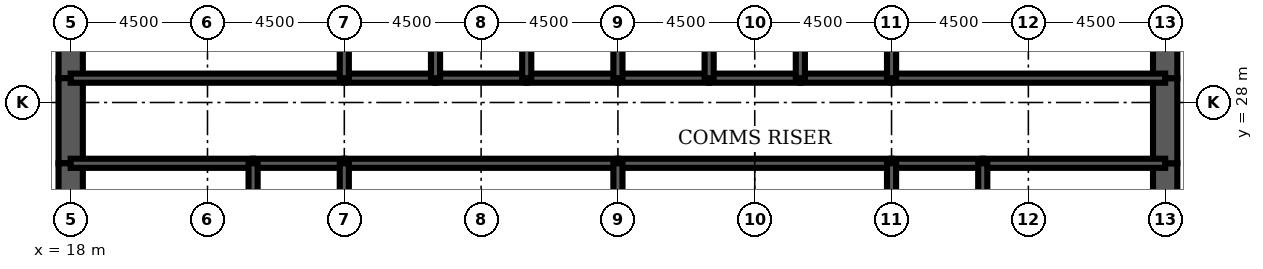
"""IFC4 building model, lengths in metres.
Left out: names, types, materials, properties, quantities, classifications, styles, units other than length and angle.
Written with IfcOpenShell. Run it as: python <this file> out.ifc"""

import sys

from ifc_helpers import new_model, si_unit, direction, frame, frame_2d, origin, place, context, subcontext, project, spatial, rectangle, extrude, element, fill, save


model = new_model("IFC4")
c1 = context("Model", 3, precision=1e-05, world=origin(), true_north=direction((0.0, 1.0)))
c2 = subcontext(c1, "Body", "Model", "MODEL_VIEW")
j1 = project(units=[si_unit("LENGTHUNIT", "METRE"), si_unit("PLANEANGLEUNIT", "RADIAN")], contexts=[c1])
p1 = place(None, origin())
s1 = spatial("IfcSite", under=j1, at=p1, CompositionType="ELEMENT")
p2 = place(p1, origin())
s2 = spatial("IfcBuilding", under=s1, at=p2, CompositionType="ELEMENT")
p3 = place(p2, frame((0.0, 0.0, 206.8)))
s3 = spatial("IfcBuildingStorey", under=s2, at=p3, CompositionType="ELEMENT", Elevation=206.8)
p4 = place(p3, frame((18.0, 32.0, 0.0), z_axis=(0.0, 0.0, 1.0), x_axis=(0.0, -1.0, 0.0)))
e1 = element("IfcWall", 1, at=p4, inside=s3, PredefinedType="SHEAR", context=c2, shape_type="SweptSolid", body=[
    extrude(rectangle(XDim=3.2, YDim=0.8, at=frame_2d((1.6, 0.0))), origin(), (0.0, 0.0, 1.0), 4.2),
])
p5 = place(p3, frame((18.0, 28.8, 0.0), z_axis=(0.0, 0.0, 1.0), x_axis=(0.0, -1.0, 0.0)))
e2 = element("IfcWall", 2, at=p5, inside=s3, PredefinedType="SHEAR", context=c2, shape_type="SweptSolid", body=[
    extrude(rectangle(XDim=2.8, YDim=0.8, at=frame_2d((1.4, 0.0))), origin(), (0.0, 0.0, 1.0), 4.2),
])
p6 = place(p5, frame((0.4, 0.0, 0.0)))
e3 = element("IfcOpeningElement", 3, at=p6, cuts=e2, PredefinedType="OPENING", context=c2, shape_type="SweptSolid", body=[
    extrude(rectangle(XDim=1.8, YDim=2.1, at=frame_2d((0.9, 1.05))), frame((0.0, 0.41, 0.0), z_axis=(0.0, -1.0, 0.0), x_axis=(1.0, 0.0, 0.0)), (0.0, 0.0, 1.0), 0.82),
])
for number, where, z_axis, x_axis in (
    (4, (18.0, 26.0, 0.0), (0.0, 0.0, 1.0), (0.0, -1.0, 0.0)),
    (5, (54.0, 22.0, 0.0), (0.0, 0.0, 1.0), (0.0, 1.0, 0.0)),
):
    element("IfcWall", number, at=place(p3, frame(where, z_axis=z_axis, x_axis=x_axis)), inside=s3, PredefinedType="SHEAR", context=c2, shape_type="SweptSolid", body=[
        extrude(rectangle(XDim=4.0, YDim=0.8, at=frame_2d((2.0, 0.0))), origin(), (0.0, 0.0, 1.0), 4.2),
    ])
p7 = place(p3, frame((54.0, 26.0, 0.0), z_axis=(0.0, 0.0, 1.0), x_axis=(0.0, 1.0, 0.0)))
e6 = element("IfcWall", 6, at=p7, inside=s3, PredefinedType="SHEAR", context=c2, shape_type="SweptSolid", body=[
    extrude(rectangle(XDim=2.8, YDim=0.8, at=frame_2d((1.4, 0.0))), origin(), (0.0, 0.0, 1.0), 4.2),
])
p8 = place(p7, frame((0.6, 0.0, 0.0)))
e7 = element("IfcOpeningElement", 7, at=p8, cuts=e6, PredefinedType="OPENING", context=c2, shape_type="SweptSolid", body=[
    extrude(rectangle(XDim=1.8, YDim=2.1, at=frame_2d((0.9, 1.05))), frame((0.0, 0.41, 0.0), z_axis=(0.0, -1.0, 0.0), x_axis=(1.0, 0.0, 0.0)), (0.0, 0.0, 1.0), 0.82),
])
p9 = place(p3, frame((54.0, 28.8, 0.0), z_axis=(0.0, 0.0, 1.0), x_axis=(0.0, 1.0, 0.0)))
e8 = element("IfcWall", 8, at=p9, inside=s3, PredefinedType="SHEAR", context=c2, shape_type="SweptSolid", body=[
    extrude(rectangle(XDim=3.2, YDim=0.8, at=frame_2d((1.6, 0.0))), origin(), (0.0, 0.0, 1.0), 4.2),
])
p10 = place(p3, frame((18.0, 28.8, 0.0), z_axis=(0.0, 0.0, 1.0), x_axis=(1.0, 0.0, 0.0)))
e9 = element("IfcWall", 9, at=p10, inside=s3, PredefinedType="SOLIDWALL", context=c2, shape_type="SweptSolid", body=[
    extrude(rectangle(XDim=9.0, YDim=0.3, at=frame_2d((4.5, 0.0))), origin(), (0.0, 0.0, 1.0), 4.2),
])
p11 = place(p10, frame((0.65, 0.0, 0.0)))
e10 = element("IfcOpeningElement", 10, at=p11, cuts=e9, PredefinedType="OPENING", context=c2, shape_type="SweptSolid", body=[
    extrude(rectangle(XDim=1.0, YDim=2.1, at=frame_2d((0.5, 1.05))), frame((0.0, 0.16, 0.0), z_axis=(0.0, -1.0, 0.0), x_axis=(1.0, 0.0, 0.0)), (0.0, 0.0, 1.0), 0.32),
])
p12 = place(p3, frame((27.0, 28.8, 0.0), z_axis=(0.0, 0.0, 1.0), x_axis=(1.0, 0.0, 0.0)))
e11 = element("IfcWall", 11, at=p12, inside=s3, PredefinedType="SOLIDWALL", context=c2, shape_type="SweptSolid", body=[
    extrude(rectangle(XDim=3.0, YDim=0.3, at=frame_2d((1.5, 0.0))), origin(), (0.0, 0.0, 1.0), 4.2),
])
p13 = place(p12, frame((0.95, 0.0, 0.0)))
e12 = element("IfcOpeningElement", 12, at=p13, cuts=e11, PredefinedType="OPENING", context=c2, shape_type="SweptSolid", body=[
    extrude(rectangle(XDim=1.1, YDim=2.2, at=frame_2d((0.55, 1.1))), frame((0.0, 0.16, 0.0), z_axis=(0.0, -1.0, 0.0), x_axis=(1.0, 0.0, 0.0)), (0.0, 0.0, 1.0), 0.32),
])
p14 = place(p3, frame((30.0, 28.8, 0.0), z_axis=(0.0, 0.0, 1.0), x_axis=(1.0, 0.0, 0.0)))
e13 = element("IfcWall", 13, at=p14, inside=s3, PredefinedType="SOLIDWALL", context=c2, shape_type="SweptSolid", body=[
    extrude(rectangle(XDim=3.0, YDim=0.3, at=frame_2d((1.5, 0.0))), origin(), (0.0, 0.0, 1.0), 4.2),
])
p15 = place(p14, frame((0.95, 0.0, 0.0)))
e14 = element("IfcOpeningElement", 14, at=p15, cuts=e13, PredefinedType="OPENING", context=c2, shape_type="SweptSolid", body=[
    extrude(rectangle(XDim=1.1, YDim=2.2, at=frame_2d((0.55, 1.1))), frame((0.0, 0.16, 0.0), z_axis=(0.0, -1.0, 0.0), x_axis=(1.0, 0.0, 0.0)), (0.0, 0.0, 1.0), 0.32),
])
p16 = place(p3, frame((33.0, 28.8, 0.0), z_axis=(0.0, 0.0, 1.0), x_axis=(1.0, 0.0, 0.0)))
e15 = element("IfcWall", 15, at=p16, inside=s3, PredefinedType="SOLIDWALL", context=c2, shape_type="SweptSolid", body=[
    extrude(rectangle(XDim=3.0, YDim=0.3, at=frame_2d((1.5, 0.0))), origin(), (0.0, 0.0, 1.0), 4.2),
])
p17 = place(p16, frame((0.95, 0.0, 0.0)))
e16 = element("IfcOpeningElement", 16, at=p17, cuts=e15, PredefinedType="OPENING", context=c2, shape_type="SweptSolid", body=[
    extrude(rectangle(XDim=1.1, YDim=2.2, at=frame_2d((0.55, 1.1))), frame((0.0, 0.16, 0.0), z_axis=(0.0, -1.0, 0.0), x_axis=(1.0, 0.0, 0.0)), (0.0, 0.0, 1.0), 0.32),
])
for number, where, z_axis, x_axis in (
    (17, (36.0, 28.8, 0.0), (0.0, 0.0, 1.0), (1.0, 0.0, 0.0)),
    (18, (39.0, 28.8, 0.0), (0.0, 0.0, 1.0), (1.0, 0.0, 0.0)),
):
    element("IfcWall", number, at=place(p3, frame(where, z_axis=z_axis, x_axis=x_axis)), inside=s3, PredefinedType="SOLIDWALL", context=c2, shape_type="SweptSolid", body=[
        extrude(rectangle(XDim=3.0, YDim=0.3, at=frame_2d((1.5, 0.0))), origin(), (0.0, 0.0, 1.0), 4.2),
    ])
p18 = place(p3, frame((42.0, 28.8, 0.0), z_axis=(0.0, 0.0, 1.0), x_axis=(1.0, 0.0, 0.0)))
e19 = element("IfcWall", 19, at=p18, inside=s3, PredefinedType="SOLIDWALL", context=c2, shape_type="SweptSolid", body=[
    extrude(rectangle(XDim=3.0, YDim=0.3, at=frame_2d((1.5, 0.0))), origin(), (0.0, 0.0, 1.0), 4.2),
])
p19 = place(p18, frame((0.95, 0.0, 0.0)))
e20 = element("IfcOpeningElement", 20, at=p19, cuts=e19, PredefinedType="OPENING", context=c2, shape_type="SweptSolid", body=[
    extrude(rectangle(XDim=1.1, YDim=2.2, at=frame_2d((0.55, 1.1))), frame((0.0, 0.16, 0.0), z_axis=(0.0, -1.0, 0.0), x_axis=(1.0, 0.0, 0.0)), (0.0, 0.0, 1.0), 0.32),
])
p20 = place(p3, frame((45.0, 28.8, 0.0), z_axis=(0.0, 0.0, 1.0), x_axis=(1.0, 0.0, 0.0)))
e21 = element("IfcWall", 21, at=p20, inside=s3, PredefinedType="SOLIDWALL", context=c2, shape_type="SweptSolid", body=[
    extrude(rectangle(XDim=9.0, YDim=0.3, at=frame_2d((4.5, 0.0))), origin(), (0.0, 0.0, 1.0), 4.2),
])
p21 = place(p20, frame((7.35, 0.0, 0.0)))
e22 = element("IfcOpeningElement", 22, at=p21, cuts=e21, PredefinedType="OPENING", context=c2, shape_type="SweptSolid", body=[
    extrude(rectangle(XDim=1.0, YDim=2.1, at=frame_2d((0.5, 1.05))), frame((0.0, 0.16, 0.0), z_axis=(0.0, -1.0, 0.0), x_axis=(1.0, 0.0, 0.0)), (0.0, 0.0, 1.0), 0.32),
])
p22 = place(p3, frame((18.0, 26.0, 0.0), z_axis=(0.0, 0.0, 1.0), x_axis=(1.0, 0.0, 0.0)))
e23 = element("IfcWall", 23, at=p22, inside=s3, PredefinedType="SOLIDWALL", context=c2, shape_type="SweptSolid", body=[
    extrude(rectangle(XDim=6.0, YDim=0.3, at=frame_2d((3.0, 0.0))), origin(), (0.0, 0.0, 1.0), 4.2),
])
p23 = place(p3, frame((24.0, 26.0, 0.0), z_axis=(0.0, 0.0, 1.0), x_axis=(1.0, 0.0, 0.0)))
e24 = element("IfcWall", 24, at=p23, inside=s3, PredefinedType="SOLIDWALL", context=c2, shape_type="SweptSolid", body=[
    extrude(rectangle(XDim=3.0, YDim=0.3, at=frame_2d((1.5, 0.0))), origin(), (0.0, 0.0, 1.0), 4.2),
])
for number, where, z_axis, x_axis in (
    (25, (27.0, 26.0, 0.0), (0.0, 0.0, 1.0), (1.0, 0.0, 0.0)),
    (26, (36.0, 26.0, 0.0), (0.0, 0.0, 1.0), (1.0, 0.0, 0.0)),
):
    element("IfcWall", number, at=place(p3, frame(where, z_axis=z_axis, x_axis=x_axis)), inside=s3, PredefinedType="SOLIDWALL", context=c2, shape_type="SweptSolid", body=[
        extrude(rectangle(XDim=9.0, YDim=0.3, at=frame_2d((4.5, 0.0))), origin(), (0.0, 0.0, 1.0), 4.2),
    ])
p24 = place(p3, frame((45.0, 26.0, 0.0), z_axis=(0.0, 0.0, 1.0), x_axis=(1.0, 0.0, 0.0)))
e27 = element("IfcWall", 27, at=p24, inside=s3, PredefinedType="SOLIDWALL", context=c2, shape_type="SweptSolid", body=[
    extrude(rectangle(XDim=3.0, YDim=0.3, at=frame_2d((1.5, 0.0))), origin(), (0.0, 0.0, 1.0), 4.2),
])
p25 = place(p3, frame((48.0, 26.0, 0.0), z_axis=(0.0, 0.0, 1.0), x_axis=(1.0, 0.0, 0.0)))
e28 = element("IfcWall", 28, at=p25, inside=s3, PredefinedType="SOLIDWALL", context=c2, shape_type="SweptSolid", body=[
    extrude(rectangle(XDim=6.0, YDim=0.3, at=frame_2d((3.0, 0.0))), origin(), (0.0, 0.0, 1.0), 4.2),
])
for number, where, z_axis, x_axis in (
    (29, (27.0, 28.8, 0.0), (0.0, 0.0, 1.0), (0.0, 1.0, 0.0)),
    (30, (30.0, 28.8, 0.0), (0.0, 0.0, 1.0), (0.0, 1.0, 0.0)),
    (31, (33.0, 28.8, 0.0), (0.0, 0.0, 1.0), (0.0, 1.0, 0.0)),
    (32, (36.0, 28.8, 0.0), (0.0, 0.0, 1.0), (0.0, 1.0, 0.0)),
    (33, (39.0, 28.8, 0.0), (0.0, 0.0, 1.0), (0.0, 1.0, 0.0)),
    (34, (42.0, 28.8, 0.0), (0.0, 0.0, 1.0), (0.0, 1.0, 0.0)),
    (35, (45.0, 28.8, 0.0), (0.0, 0.0, 1.0), (0.0, 1.0, 0.0)),
):
    element("IfcWall", number, at=place(p3, frame(where, z_axis=z_axis, x_axis=x_axis)), inside=s3, PredefinedType="SOLIDWALL", context=c2, shape_type="SweptSolid", body=[
        extrude(rectangle(XDim=3.2, YDim=0.3, at=frame_2d((1.6, 0.0))), origin(), (0.0, 0.0, 1.0), 4.2),
    ])
for number, where, z_axis, x_axis in (
    (36, (24.0, 22.0, 0.0), (0.0, 0.0, 1.0), (0.0, 1.0, 0.0)),
    (37, (27.0, 22.0, 0.0), (0.0, 0.0, 1.0), (0.0, 1.0, 0.0)),
    (38, (36.0, 22.0, 0.0), (0.0, 0.0, 1.0), (0.0, 1.0, 0.0)),
    (39, (45.0, 22.0, 0.0), (0.0, 0.0, 1.0), (0.0, 1.0, 0.0)),
    (40, (48.0, 22.0, 0.0), (0.0, 0.0, 1.0), (0.0, 1.0, 0.0)),
):
    element("IfcWall", number, at=place(p3, frame(where, z_axis=z_axis, x_axis=x_axis)), inside=s3, PredefinedType="SOLIDWALL", context=c2, shape_type="SweptSolid", body=[
        extrude(rectangle(XDim=4.0, YDim=0.3, at=frame_2d((2.0, 0.0))), origin(), (0.0, 0.0, 1.0), 4.2),
    ])
p26 = place(p3, frame((38.0, 22.15, 0.0), z_axis=(0.0, 0.0, 1.0), x_axis=(0.0, 1.0, 0.0)))
e41 = element("IfcWall", 41, at=p26, inside=s3, PredefinedType="PARTITIONING", context=c2, shape_type="SweptSolid", body=[
    extrude(rectangle(XDim=3.7, YDim=0.15, at=frame_2d((1.85, 0.0))), origin(), (0.0, 0.0, 1.0), 3.0),
])
p27 = place(p26, frame((2.2, 0.0, 0.0)))
e42 = element("IfcOpeningElement", 42, at=p27, cuts=e41, PredefinedType="OPENING", context=c2, shape_type="SweptSolid", body=[
    extrude(rectangle(XDim=1.0, YDim=2.1, at=frame_2d((0.5, 1.05))), frame((0.0, 0.085, 0.0), z_axis=(0.0, -1.0, 0.0), x_axis=(1.0, 0.0, 0.0)), (0.0, 0.0, 1.0), 0.17),
])
for number, where, z_axis, x_axis in (
    (43, (20.575, 22.15, 0.0), (0.0, 0.0, 1.0), (0.0, 1.0, 0.0)),
    (44, (52.025, 22.15, 0.0), (0.0, 0.0, 1.0), (0.0, 1.0, 0.0)),
):
    element("IfcWall", number, at=place(p3, frame(where, z_axis=z_axis, x_axis=x_axis)), inside=s3, PredefinedType="PARTITIONING", context=c2, shape_type="SweptSolid", body=[
        extrude(rectangle(XDim=3.7, YDim=0.15, at=frame_2d((1.85, 0.0))), origin(), (0.0, 0.0, 1.0), 3.0),
    ])
p28 = place(p27, origin())
e45 = element("IfcDoor", 45, at=p28, inside=s3, OperationType="SINGLE_SWING_RIGHT", PredefinedType="DOOR", context=c2, shape_type="SweptSolid", body=[
    extrude(rectangle(XDim=1.0, YDim=2.1, at=frame_2d((0.5, 1.05))), frame((0.0, 0.025, 0.0), z_axis=(0.0, -1.0, 0.0), x_axis=(1.0, 0.0, 0.0)), (0.0, 0.0, 1.0), 0.05),
])
fill(e42, e45)
p29 = place(p19, origin())
e46 = element("IfcDoor", 46, at=p29, inside=s3, OperationType="DOUBLE_DOOR_SLIDING", PredefinedType="USERDEFINED", context=c2, shape_type="SweptSolid", body=[
    extrude(rectangle(XDim=1.1, YDim=2.2, at=frame_2d((0.55, 1.1))), frame((0.0, 0.025, 0.0), z_axis=(0.0, -1.0, 0.0), x_axis=(1.0, 0.0, 0.0)), (0.0, 0.0, 1.0), 0.05),
])
fill(e20, e46)
p30 = place(p13, origin())
e47 = element("IfcDoor", 47, at=p30, inside=s3, OperationType="DOUBLE_DOOR_SLIDING", PredefinedType="USERDEFINED", context=c2, shape_type="SweptSolid", body=[
    extrude(rectangle(XDim=1.1, YDim=2.2, at=frame_2d((0.55, 1.1))), frame((0.0, 0.025, 0.0), z_axis=(0.0, -1.0, 0.0), x_axis=(1.0, 0.0, 0.0)), (0.0, 0.0, 1.0), 0.05),
])
fill(e12, e47)
p31 = place(p15, origin())
e48 = element("IfcDoor", 48, at=p31, inside=s3, OperationType="DOUBLE_DOOR_SLIDING", PredefinedType="USERDEFINED", context=c2, shape_type="SweptSolid", body=[
    extrude(rectangle(XDim=1.1, YDim=2.2, at=frame_2d((0.55, 1.1))), frame((0.0, 0.025, 0.0), z_axis=(0.0, -1.0, 0.0), x_axis=(1.0, 0.0, 0.0)), (0.0, 0.0, 1.0), 0.05),
])
fill(e14, e48)
p32 = place(p17, origin())
e49 = element("IfcDoor", 49, at=p32, inside=s3, OperationType="DOUBLE_DOOR_SLIDING", PredefinedType="USERDEFINED", context=c2, shape_type="SweptSolid", body=[
    extrude(rectangle(XDim=1.1, YDim=2.2, at=frame_2d((0.55, 1.1))), frame((0.0, 0.025, 0.0), z_axis=(0.0, -1.0, 0.0), x_axis=(1.0, 0.0, 0.0)), (0.0, 0.0, 1.0), 0.05),
])
fill(e16, e49)
p33 = place(p11, origin())
e50 = element("IfcDoor", 50, at=p33, inside=s3, OperationType="SINGLE_SWING_LEFT", PredefinedType="DOOR", context=c2, shape_type="SweptSolid", body=[
    extrude(rectangle(XDim=1.0, YDim=2.1, at=frame_2d((0.5, 1.05))), frame((0.0, 0.025, 0.0), z_axis=(0.0, -1.0, 0.0), x_axis=(1.0, 0.0, 0.0)), (0.0, 0.0, 1.0), 0.05),
])
fill(e10, e50)
p34 = place(p21, origin())
e51 = element("IfcDoor", 51, at=p34, inside=s3, OperationType="SINGLE_SWING_RIGHT", PredefinedType="DOOR", context=c2, shape_type="SweptSolid", body=[
    extrude(rectangle(XDim=1.0, YDim=2.1, at=frame_2d((0.5, 1.05))), frame((0.0, 0.025, 0.0), z_axis=(0.0, -1.0, 0.0), x_axis=(1.0, 0.0, 0.0)), (0.0, 0.0, 1.0), 0.05),
])
fill(e22, e51)
p35 = place(p6, origin())
e52 = element("IfcDoor", 52, at=p35, inside=s3, OperationType="SINGLE_SWING_LEFT", PredefinedType="DOOR", context=c2, shape_type="SweptSolid", body=[
    extrude(rectangle(XDim=1.8, YDim=2.1, at=frame_2d((0.9, 1.05))), frame((0.0, 0.4, 0.0), z_axis=(0.0, -1.0, 0.0), x_axis=(1.0, 0.0, 0.0)), (0.0, 0.0, 1.0), 0.8),
])
fill(e3, e52)
p36 = place(p8, origin())
e53 = element("IfcDoor", 53, at=p36, inside=s3, OperationType="SINGLE_SWING_LEFT", PredefinedType="DOOR", context=c2, shape_type="SweptSolid", body=[
    extrude(rectangle(XDim=1.8, YDim=2.1, at=frame_2d((0.9, 1.05))), frame((0.0, 0.4, 0.0), z_axis=(0.0, -1.0, 0.0), x_axis=(1.0, 0.0, 0.0)), (0.0, 0.0, 1.0), 0.8),
])
fill(e7, e53)
save(model, sys.argv[1])
